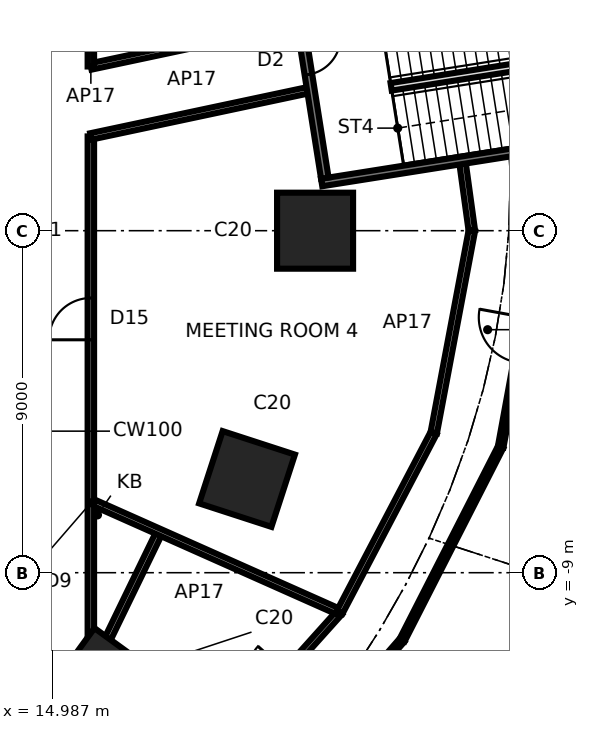
"""IFC4 building model, lengths in metres.
Left out: names, types, materials, properties, quantities, classifications, styles, units other than length and angle.
Written with IfcOpenShell. Run it as: python <this file> out.ifc"""

import sys

from ifc_helpers import new_model, si_unit, direction, frame, frame_2d, origin, origin_2d, place, context, subcontext, project, spatial, rectangle, extrude, element, fill, save


model = new_model("IFC4")
c1 = context("Model", 3, precision=1e-05, world=origin(), true_north=direction((0.0, 1.0)))
c2 = subcontext(c1, "Body", "Model", "MODEL_VIEW")
j1 = project(units=[si_unit("LENGTHUNIT", "METRE"), si_unit("PLANEANGLEUNIT", "RADIAN")], contexts=[c1])
p1 = place(None, origin())
s1 = spatial("IfcSite", under=j1, at=p1, CompositionType="ELEMENT")
p2 = place(p1, origin())
s2 = spatial("IfcBuilding", under=s1, at=p2, CompositionType="ELEMENT")
p3 = place(p2, frame((0.0, 0.0, 5.6)))
s3 = spatial("IfcBuildingStorey", under=s2, at=p3, CompositionType="ELEMENT", Elevation=5.6)
for number, where, z_axis, x_axis in (
    (1, (21.9, 0.0, 0.0), (0.0, 0.0, 1.0), (1.0, 0.0, 0.0)),
    (2, (16.315, -11.854, 0.0), (0.0, 0.0, 1.0), (0.809, -0.588, 0.0)),
    (3, (20.109, -6.534, 0.0), (0.0, 0.0, 1.0), (0.951, -0.309, 0.0)),
):
    element("IfcColumn", number, at=place(p3, frame(where, z_axis=z_axis, x_axis=x_axis)), inside=s3, PredefinedType="COLUMN", context=c2, shape_type="SweptSolid", body=[
        extrude(rectangle(XDim=2.0, YDim=2.0, at=origin_2d()), origin(), (0.0, 0.0, 1.0), 5.0),
    ])
p4 = place(p3, frame((17.808, -7.929, 0.0), z_axis=(0.0, 0.0, 1.0), x_axis=(-0.436602321688, -0.899654607445, 0.0)))
e4 = element("IfcWall", 4, at=p4, inside=s3, PredefinedType="PARTITIONING", context=c2, shape_type="SweptSolid", body=[
    extrude(rectangle(XDim=4.117, YDim=0.17, at=frame_2d((2.058, 0.0))), origin(), (0.0, 0.0, 1.0), 4.8),
])
p5 = place(p3, frame((20.557, -14.936, 0.0), z_axis=(0.0, 0.0, 1.0), x_axis=(0.657584842261, 0.753380498307, 0.0)))
e5 = element("IfcWall", 5, at=p5, inside=s3, PredefinedType="PARTITIONING", context=c2, shape_type="SweptSolid", body=[
    extrude(rectangle(XDim=5.528, YDim=0.15, at=frame_2d((2.764, 0.0))), origin(), (0.0, 0.0, 1.0), 4.8),
])
p6 = place(p3, frame((22.548, -10.039, 0.0), z_axis=(0.0, 0.0, 1.0), x_axis=(-0.668135531852, -0.744039589724, 0.0)))
e6 = element("IfcWall", 6, at=p6, inside=s3, PredefinedType="PARTITIONING", context=c2, shape_type="SweptSolid", body=[
    extrude(rectangle(XDim=5.159, YDim=0.17, at=frame_2d((2.58, 0.0))), origin(), (0.0, 0.0, 1.0), 4.8),
])
p7 = place(p6, frame((2.105, 0.0, 0.0)))
e7 = element("IfcOpeningElement", 7, at=p7, cuts=e6, PredefinedType="OPENING", context=c2, shape_type="SweptSolid", body=[
    extrude(rectangle(XDim=1.0, YDim=2.4, at=frame_2d((0.5, 1.2))), frame((0.0, 0.095, 0.0), z_axis=(0.0, -1.0, 0.0), x_axis=(1.0, 0.0, 0.0)), (0.0, 0.0, 1.0), 0.19),
])
p8 = place(p3, frame((22.548, -10.039, 0.0), z_axis=(0.0, 0.0, 1.0), x_axis=(-0.913552901279, 0.406719923982, 0.0)))
e8 = element("IfcWall", 8, at=p8, inside=s3, PredefinedType="PARTITIONING", context=c2, shape_type="SweptSolid", body=[
    extrude(rectangle(XDim=7.167, YDim=0.17, at=frame_2d((3.583, 0.0))), origin(), (0.0, 0.0, 1.0), 4.8),
])
p9 = place(p3, frame((24.192, -10.771, 0.0), z_axis=(0.0, 0.0, 1.0), x_axis=(0.454462020031, 0.890766115402, 0.0)))
e9 = element("IfcWall", 9, at=p9, inside=s3, PredefinedType="PARTITIONING", context=c2, shape_type="SweptSolid", body=[
    extrude(rectangle(XDim=5.701, YDim=0.15, at=frame_2d((2.851, 0.0))), origin(), (0.0, 0.0, 1.0), 4.8),
])
p10 = place(p3, frame((25.022, -5.319, 0.0), z_axis=(0.0, 0.0, 1.0), x_axis=(-0.464318498757, -0.885668296662, 0.0)))
e10 = element("IfcWall", 10, at=p10, inside=s3, PredefinedType="PARTITIONING", context=c2, shape_type="SweptSolid", body=[
    extrude(rectangle(XDim=5.33, YDim=0.17, at=frame_2d((2.665, 0.0))), origin(), (0.0, 0.0, 1.0), 4.8),
])
p11 = place(p3, frame((16.0, -11.3, 0.0), z_axis=(0.0, 0.0, 1.0), x_axis=(0.0, 1.0, 0.0)))
e11 = element("IfcWall", 11, at=p11, inside=s3, PredefinedType="PARTITIONING", context=c2, shape_type="SweptSolid", body=[
    extrude(rectangle(XDim=13.781, YDim=0.17, at=frame_2d((6.89, 0.0))), origin(), (0.0, 0.0, 1.0), 4.8),
])
p12 = place(p11, frame((8.429, 0.0, 0.0)))
e12 = element("IfcOpeningElement", 12, at=p12, cuts=e11, PredefinedType="OPENING", context=c2, shape_type="SweptSolid", body=[
    extrude(rectangle(XDim=1.1, YDim=2.4, at=frame_2d((0.55, 1.2))), frame((0.0, 0.095, 0.0), z_axis=(0.0, -1.0, 0.0), x_axis=(1.0, 0.0, 0.0)), (0.0, 0.0, 1.0), 0.19),
])
p13 = place(p3, frame((26.783, -5.693, 0.0), z_axis=(0.0, 0.0, 1.0), x_axis=(0.180084349052, 0.983651171517, 0.0)))
e13 = element("IfcWall", 13, at=p13, inside=s3, PredefinedType="PARTITIONING", context=c2, shape_type="SweptSolid", body=[
    extrude(rectangle(XDim=5.788, YDim=0.15, at=frame_2d((2.894, 0.0))), origin(), (0.0, 0.0, 1.0), 4.8),
])
p14 = place(p13, frame((2.269, 0.0, 0.0)))
e14 = element("IfcOpeningElement", 14, at=p14, cuts=e13, PredefinedType="OPENING", context=c2, shape_type="SweptSolid", body=[
    extrude(rectangle(XDim=1.2, YDim=2.4, at=frame_2d((0.6, 1.2))), frame((0.0, 0.085, 0.0), z_axis=(0.0, -1.0, 0.0), x_axis=(1.0, 0.0, 0.0)), (0.0, 0.0, 1.0), 0.17),
])
p15 = place(p3, frame((26.025, 0.0, 0.0), z_axis=(0.0, 0.0, 1.0), x_axis=(-0.185260746547, -0.982689399449, 0.0)))
e15 = element("IfcWall", 15, at=p15, inside=s3, PredefinedType="PARTITIONING", context=c2, shape_type="SweptSolid", body=[
    extrude(rectangle(XDim=5.412, YDim=0.17, at=frame_2d((2.706, 0.0))), origin(), (0.0, 0.0, 1.0), 4.8),
])
p16 = place(p3, frame((25.784, 1.755, 0.0), z_axis=(0.0, 0.0, 1.0), x_axis=(0.136152406276, -0.990687903563, 0.0)))
e16 = element("IfcWall", 16, at=p16, inside=s3, PredefinedType="PARTITIONING", context=c2, shape_type="SweptSolid", body=[
    extrude(rectangle(XDim=1.772, YDim=0.17, at=frame_2d((0.886, 0.0))), origin(), (0.0, 0.0, 1.0), 4.8),
])
p17 = place(p3, frame((16.0, 2.481, 0.0), z_axis=(0.0, 0.0, 1.0), x_axis=(0.978144448143, 0.207926522038, 0.0)))
e17 = element("IfcWall", 17, at=p17, inside=s3, PredefinedType="PARTITIONING", context=c2, shape_type="SweptSolid", body=[
    extrude(rectangle(XDim=5.817, YDim=0.17, at=frame_2d((2.908, 0.0))), origin(), (0.0, 0.0, 1.0), 4.8),
])
p18 = place(p3, frame((21.408, 5.47, 0.0), z_axis=(0.0, 0.0, 1.0), x_axis=(-0.978148748832, -0.207906289368, 0.0)))
e18 = element("IfcWall", 18, at=p18, inside=s3, PredefinedType="PARTITIONING", context=c2, shape_type="SweptSolid", body=[
    extrude(rectangle(XDim=5.529, YDim=0.17, at=frame_2d((2.764, 0.0))), origin(), (0.0, 0.0, 1.0), 4.8),
])
p19 = place(p3, frame((16.0, 4.321, 0.0), z_axis=(0.0, 0.0, 1.0), x_axis=(0.0, 1.0, 0.0)))
e19 = element("IfcWall", 19, at=p19, inside=s3, PredefinedType="PARTITIONING", context=c2, shape_type="SweptSolid", body=[
    extrude(rectangle(XDim=6.979, YDim=0.17, at=frame_2d((3.49, 0.0))), origin(), (0.0, 0.0, 1.0), 4.8),
])
p20 = place(p19, frame((2.965, 0.0, 0.0)))
e20 = element("IfcOpeningElement", 20, at=p20, cuts=e19, PredefinedType="OPENING", context=c2, shape_type="SweptSolid", body=[
    extrude(rectangle(XDim=1.1, YDim=2.4, at=frame_2d((0.55, 1.2))), frame((0.0, 0.095, 0.0), z_axis=(0.0, -1.0, 0.0), x_axis=(1.0, 0.0, 0.0)), (0.0, 0.0, 1.0), 0.19),
])
p21 = place(p3, frame((22.073, 1.269, 0.0), z_axis=(0.0, 0.0, 1.0), x_axis=(0.987684853285, 0.156456481465, 0.0)))
e21 = element("IfcWall", 21, at=p21, inside=s3, PredefinedType="SOLIDWALL", context=c2, shape_type="SweptSolid", body=[
    extrude(rectangle(XDim=8.3, YDim=0.2, at=frame_2d((4.15, 0.0))), origin(), (0.0, 0.0, 1.0), 4.8),
])
p22 = place(p3, frame((22.156, 1.383, 0.0), z_axis=(0.0, 0.0, 1.0), x_axis=(-0.156428225752, 0.987689328781, 0.0)))
e22 = element("IfcWall", 22, at=p22, inside=s3, PredefinedType="SOLIDWALL", context=c2, shape_type="SweptSolid", body=[
    extrude(rectangle(XDim=4.2, YDim=0.2, at=frame_2d((2.1, 0.0))), origin(), (0.0, 0.0, 1.0), 4.8),
])
p23 = place(p22, frame((2.76, 0.0, 0.0)))
e23 = element("IfcOpeningElement", 23, at=p23, cuts=e22, PredefinedType="OPENING", context=c2, shape_type="SweptSolid", body=[
    extrude(rectangle(XDim=1.0, YDim=2.1, at=frame_2d((0.5, 1.05))), frame((0.0, 0.11, 0.0), z_axis=(0.0, -1.0, 0.0), x_axis=(1.0, 0.0, 0.0)), (0.0, 0.0, 1.0), 0.22),
])
p24 = place(p3, frame((23.902, 3.786, 0.0), z_axis=(0.0, 0.0, 1.0), x_axis=(0.987681481506, 0.156477765482, 0.0)))
e24 = element("IfcWall", 24, at=p24, inside=s3, PredefinedType="SOLIDWALL", context=c2, shape_type="SweptSolid", body=[
    extrude(rectangle(XDim=3.796, YDim=0.2, at=frame_2d((1.898, 0.0))), origin(), (0.0, 0.0, 1.0), 5.0),
])
p25 = place(p12, origin())
e25 = element("IfcDoor", 25, at=p25, inside=s3, OperationType="SINGLE_SWING_LEFT", PredefinedType="DOOR", context=c2, shape_type="SweptSolid", body=[
    extrude(rectangle(XDim=1.1, YDim=2.4, at=frame_2d((0.55, 1.2))), frame((0.0, 0.025, 0.0), z_axis=(0.0, -1.0, 0.0), x_axis=(1.0, 0.0, 0.0)), (0.0, 0.0, 1.0), 0.05),
])
fill(e12, e25)
p26 = place(p23, frame((1.0, 0.0, 0.0), z_axis=(0.0, 0.0, 1.0), x_axis=(-1.0, 0.0, 0.0)))
e26 = element("IfcDoor", 26, at=p26, inside=s3, OperationType="SINGLE_SWING_LEFT", PredefinedType="DOOR", context=c2, shape_type="SweptSolid", body=[
    extrude(rectangle(XDim=1.0, YDim=2.1, at=frame_2d((0.5, 1.05))), frame((0.0, 0.025, 0.0), z_axis=(0.0, -1.0, 0.0), x_axis=(1.0, 0.0, 0.0)), (0.0, 0.0, 1.0), 0.05),
])
fill(e23, e26)
save(model, sys.argv[1])
